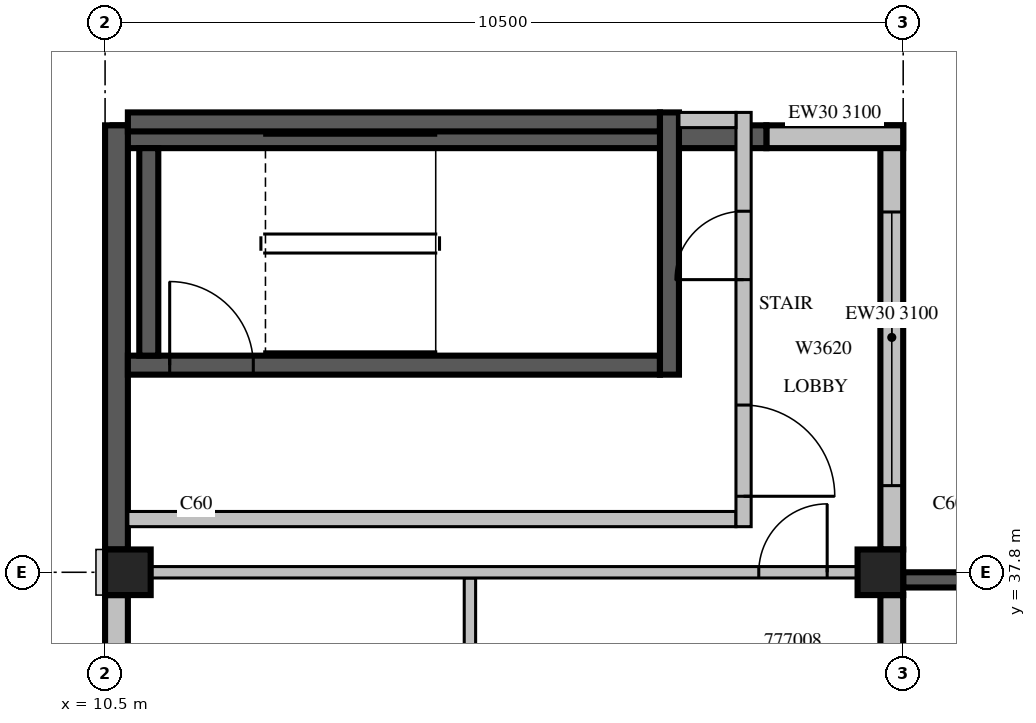
"""IFC4 building model, lengths in metres.
Left out: names, types, materials, properties, quantities, classifications, styles, units other than length and angle.
Written with IfcOpenShell. Run it as: python <this file> out.ifc"""

import sys

from ifc_helpers import new_model, si_unit, direction, frame, frame_2d, origin, origin_2d, place, context, subcontext, project, spatial, rectangle, extrude, source, transform, mapped, element, fill, save


model = new_model("IFC4")
c1 = context("Model", 3, precision=1e-05, world=origin(), true_north=direction((0.0, 1.0)))
c2 = subcontext(c1, "Body", "Model", "MODEL_VIEW")
j1 = project(units=[si_unit("LENGTHUNIT", "METRE"), si_unit("PLANEANGLEUNIT", "RADIAN")], contexts=[c1])
p1 = place(None, origin())
s1 = spatial("IfcSite", under=j1, at=p1, CompositionType="ELEMENT")
p2 = place(p1, origin())
s2 = spatial("IfcBuilding", under=s1, at=p2, CompositionType="ELEMENT")
p3 = place(p2, frame((0.0, 0.0, 330.0)))
s3 = spatial("IfcBuildingStorey", under=s2, at=p3, CompositionType="ELEMENT", Elevation=330.0)
m1 = source(origin(), c2, "Body", "SweptSolid", [
    extrude(rectangle(XDim=0.6, YDim=0.6, at=origin_2d()), origin(), (0.0, 0.0, 1.0), 3.5),
])
for number, where, z_axis, x_axis in (
    (1, (10.8, 37.8, 0.0), (0.0, 0.0, 1.0), (1.0, 0.0, 0.0)),
    (2, (20.7, 37.8, 0.0), (0.0, 0.0, 1.0), (1.0, 0.0, 0.0)),
):
    element("IfcColumn", number, at=place(p3, frame(where, z_axis=z_axis, x_axis=x_axis)), inside=s3, PredefinedType="COLUMN", context=c2, shape_type="MappedRepresentation", body=[
        mapped(m1, transform((0.0, 0.0, 0.0), scale=1.0)),
    ])
m2 = source(origin(), c2, "Body", "SweptSolid", [
    extrude(rectangle(XDim=7.8, YDim=0.3, at=frame_2d((3.9, 0.0))), origin(), (0.0, 0.0, 1.0), 3.1),
])
p4 = place(p3, frame((20.85, 29.7, 0.0), z_axis=(0.0, 0.0, 1.0), x_axis=(0.0, 1.0, 0.0)))
e3 = element("IfcWall", 3, at=p4, inside=s3, PredefinedType="STANDARD", context=c2, shape_type="MappedRepresentation", body=[
    mapped(m2, transform((0.0, 0.0, 0.0), scale=1.0)),
])
m3 = source(origin(), c2, "Body", "SweptSolid", [
    extrude(rectangle(XDim=1.0, YDim=2.1, at=frame_2d((0.5, 1.05))), frame((0.0, 0.16, 0.0), z_axis=(0.0, -1.0, 0.0), x_axis=(1.0, 0.0, 0.0)), (0.0, 0.0, 1.0), 0.32),
])
p5 = place(p4, frame((3.4, 0.0, 0.0)))
e4 = element("IfcOpeningElement", 4, at=p5, cuts=e3, PredefinedType="OPENING", context=c2, shape_type="MappedRepresentation", body=[
    mapped(m3, transform((0.0, 0.0, 0.0), scale=1.0)),
])
m4 = source(origin(), c2, "Body", "SweptSolid", [
    extrude(rectangle(XDim=5.58, YDim=0.3, at=frame_2d((2.79, 0.0))), origin(), (0.0, 0.0, 1.0), 3.1),
])
p6 = place(p3, frame((20.85, 38.1, 0.0), z_axis=(0.0, 0.0, 1.0), x_axis=(0.0, 1.0, 0.0)))
e5 = element("IfcWall", 5, at=p6, inside=s3, PredefinedType="STANDARD", context=c2, shape_type="MappedRepresentation", body=[
    mapped(m4, transform((0.0, 0.0, 0.0), scale=1.0)),
])
m5 = source(origin(), c2, "Body", "SweptSolid", [
    extrude(rectangle(XDim=3.6, YDim=2.0, at=frame_2d((1.8, 1.0))), frame((0.0, 0.16, 0.0), z_axis=(0.0, -1.0, 0.0), x_axis=(1.0, 0.0, 0.0)), (0.0, 0.0, 1.0), 0.32),
])
p7 = place(p6, frame((0.84, 0.0, 0.6)))
e6 = element("IfcOpeningElement", 6, at=p7, cuts=e5, PredefinedType="OPENING", context=c2, shape_type="MappedRepresentation", body=[
    mapped(m5, transform((0.0, 0.0, 0.0), scale=1.0)),
])
m6 = source(origin(), c2, "Body", "SweptSolid", [
    extrude(rectangle(XDim=1.8, YDim=0.3, at=frame_2d((0.9, 0.0))), origin(), (0.0, 0.0, 1.0), 3.1),
])
p8 = place(p3, frame((21.0, 43.53, 0.0), z_axis=(0.0, 0.0, 1.0), x_axis=(-1.0, 0.0, 0.0)))
e7 = element("IfcWall", 7, at=p8, inside=s3, PredefinedType="STANDARD", context=c2, shape_type="MappedRepresentation", body=[
    mapped(m6, transform((0.0, 0.0, 0.0), scale=1.0)),
])
m7 = source(origin(), c2, "Body", "SweptSolid", [
    extrude(rectangle(XDim=8.6, YDim=0.3, at=frame_2d((4.3, 0.0))), origin(), (0.0, 0.0, 1.0), 3.1),
])
p9 = place(p3, frame((19.2, 43.53, 0.0), z_axis=(0.0, 0.0, 1.0), x_axis=(-1.0, 0.0, 0.0)))
e8 = element("IfcWall", 8, at=p9, inside=s3, PredefinedType="SOLIDWALL", context=c2, shape_type="MappedRepresentation", body=[
    mapped(m7, transform((0.0, 0.0, 0.0), scale=1.0)),
])
m8 = source(origin(), c2, "Body", "SweptSolid", [
    extrude(rectangle(XDim=5.58, YDim=0.3, at=frame_2d((2.79, 0.0))), origin(), (0.0, 0.0, 1.0), 3.1),
])
p10 = place(p3, frame((10.65, 43.68, 0.0), z_axis=(0.0, 0.0, 1.0), x_axis=(0.0, -1.0, 0.0)))
e9 = element("IfcWall", 9, at=p10, inside=s3, PredefinedType="SOLIDWALL", context=c2, shape_type="MappedRepresentation", body=[
    mapped(m8, transform((0.0, 0.0, 0.0), scale=1.0)),
])
p11 = place(p3, frame((10.65, 37.5, 0.0), z_axis=(0.0, 0.0, 1.0), x_axis=(0.0, -1.0, 0.0)))
e10 = element("IfcWall", 10, at=p11, inside=s3, PredefinedType="STANDARD", context=c2, shape_type="MappedRepresentation", body=[
    mapped(m2, transform((0.0, 0.0, 0.0), scale=1.0)),
])
p12 = place(p11, frame((3.82, 0.0, 0.0)))
e11 = element("IfcOpeningElement", 11, at=p12, cuts=e10, PredefinedType="OPENING", context=c2, shape_type="MappedRepresentation", body=[
    mapped(m3, transform((0.0, 0.0, 0.0), scale=1.0)),
])
m9 = source(origin(), c2, "Body", "SweptSolid", [
    extrude(rectangle(XDim=3.9, YDim=0.2, at=frame_2d((1.95, 0.0))), origin(), (0.0, 0.0, 1.0), 3.09),
])
p13 = place(p3, frame((21.0, 37.7, 0.0), z_axis=(0.0, 0.0, 1.0), x_axis=(1.0, 0.0, 0.0)))
e12 = element("IfcWall", 12, at=p13, inside=s3, PredefinedType="SOLIDWALL", context=c2, shape_type="MappedRepresentation", body=[
    mapped(m9, transform((0.0, 0.0, 0.0), scale=1.0)),
])
m10 = source(origin(), c2, "Body", "SweptSolid", [
    extrude(rectangle(XDim=2.4, YDim=2.0, at=frame_2d((1.2, 1.0))), frame((0.0, 0.11, 0.0), z_axis=(0.0, -1.0, 0.0), x_axis=(1.0, 0.0, 0.0)), (0.0, 0.0, 1.0), 0.22),
])
p14 = place(p13, frame((0.75, 0.0, 0.6)))
e13 = element("IfcOpeningElement", 13, at=p14, cuts=e12, PredefinedType="OPENING", context=c2, shape_type="MappedRepresentation", body=[
    mapped(m10, transform((0.0, 0.0, 0.0), scale=1.0)),
])
m11 = source(origin(), c2, "Body", "SweptSolid", [
    extrude(rectangle(XDim=7.0, YDim=0.25, at=frame_2d((3.5, 0.0))), origin(), (0.0, 0.0, 1.0), 3.1),
])
p15 = place(p3, frame((10.8, 40.525, 0.0), z_axis=(0.0, 0.0, 1.0), x_axis=(1.0, 0.0, 0.0)))
e14 = element("IfcWall", 14, at=p15, inside=s3, PredefinedType="SOLIDWALL", context=c2, shape_type="MappedRepresentation", body=[
    mapped(m11, transform((0.0, 0.0, 0.0), scale=1.0)),
])
m12 = source(origin(), c2, "Body", "SweptSolid", [
    extrude(rectangle(XDim=1.1, YDim=2.1, at=frame_2d((0.55, 1.05))), frame((0.0, 0.135, 0.0), z_axis=(0.0, -1.0, 0.0), x_axis=(1.0, 0.0, 0.0)), (0.0, 0.0, 1.0), 0.27),
])
p16 = place(p15, frame((0.55, 0.0, 0.0)))
e15 = element("IfcOpeningElement", 15, at=p16, cuts=e14, PredefinedType="OPENING", context=c2, shape_type="MappedRepresentation", body=[
    mapped(m12, transform((0.0, 0.0, 0.0), scale=1.0)),
])
p17 = place(p3, frame((10.8, 43.725, 0.0), z_axis=(0.0, 0.0, 1.0), x_axis=(1.0, 0.0, 0.0)))
e16 = element("IfcWall", 16, at=p17, inside=s3, PredefinedType="SOLIDWALL", context=c2, shape_type="MappedRepresentation", body=[
    mapped(m11, transform((0.0, 0.0, 0.0), scale=1.0)),
])
m13 = source(origin(), c2, "Body", "SweptSolid", [
    extrude(rectangle(XDim=3.45, YDim=0.25, at=frame_2d((1.725, 0.0))), origin(), (0.0, 0.0, 1.0), 3.1),
])
p18 = place(p3, frame((17.925, 40.4, 0.0), z_axis=(0.0, 0.0, 1.0), x_axis=(0.0, 1.0, 0.0)))
e17 = element("IfcWall", 17, at=p18, inside=s3, PredefinedType="SOLIDWALL", context=c2, shape_type="MappedRepresentation", body=[
    mapped(m13, transform((0.0, 0.0, 0.0), scale=1.0)),
])
m14 = source(origin(), c2, "Body", "SweptSolid", [
    extrude(rectangle(XDim=2.73, YDim=0.25, at=frame_2d((1.365, 0.0))), origin(), (0.0, 0.0, 1.0), 3.1),
])
p19 = place(p3, frame((11.075, 40.65, 0.0), z_axis=(0.0, 0.0, 1.0), x_axis=(0.0, 1.0, 0.0)))
e18 = element("IfcWall", 18, at=p19, inside=s3, PredefinedType="SOLIDWALL", context=c2, shape_type="MappedRepresentation", body=[
    mapped(m14, transform((0.0, 0.0, 0.0), scale=1.0)),
])
m15 = source(origin(), c2, "Body", "SweptSolid", [
    extrude(rectangle(XDim=8.0, YDim=0.2, at=frame_2d((4.0, 0.0))), origin(), (0.0, 0.0, 1.0), 3.1),
])
p20 = place(p3, frame((10.8, 38.5, 0.0), z_axis=(0.0, 0.0, 1.0), x_axis=(1.0, 0.0, 0.0)))
e19 = element("IfcWall", 19, at=p20, inside=s3, PredefinedType="PARTITIONING", context=c2, shape_type="MappedRepresentation", body=[
    mapped(m15, transform((0.0, 0.0, 0.0), scale=1.0)),
])
m16 = source(origin(), c2, "Body", "SweptSolid", [
    extrude(rectangle(XDim=5.45, YDim=0.2, at=frame_2d((2.725, 0.0))), origin(), (0.0, 0.0, 1.0), 3.1),
])
p21 = place(p3, frame((18.9, 38.4, 0.0), z_axis=(0.0, 0.0, 1.0), x_axis=(0.0, 1.0, 0.0)))
e20 = element("IfcWall", 20, at=p21, inside=s3, PredefinedType="PARTITIONING", context=c2, shape_type="MappedRepresentation", body=[
    mapped(m16, transform((0.0, 0.0, 0.0), scale=1.0)),
])
m17 = source(origin(), c2, "Body", "SweptSolid", [
    extrude(rectangle(XDim=1.2, YDim=2.1, at=frame_2d((0.6, 1.05))), frame((0.0, 0.11, 0.0), z_axis=(0.0, -1.0, 0.0), x_axis=(1.0, 0.0, 0.0)), (0.0, 0.0, 1.0), 0.22),
])
p22 = place(p21, frame((0.4, 0.0, 0.0)))
e21 = element("IfcOpeningElement", 21, at=p22, cuts=e20, PredefinedType="OPENING", context=c2, shape_type="MappedRepresentation", body=[
    mapped(m17, transform((0.0, 0.0, 0.0), scale=1.0)),
])
m18 = source(origin(), c2, "Body", "SweptSolid", [
    extrude(rectangle(XDim=0.9, YDim=2.1, at=frame_2d((0.45, 1.05))), frame((0.0, 0.11, 0.0), z_axis=(0.0, -1.0, 0.0), x_axis=(1.0, 0.0, 0.0)), (0.0, 0.0, 1.0), 0.22),
])
p23 = place(p21, frame((3.25, 0.0, 0.0)))
e22 = element("IfcOpeningElement", 22, at=p23, cuts=e20, PredefinedType="OPENING", context=c2, shape_type="MappedRepresentation", body=[
    mapped(m18, transform((0.0, 0.0, 0.0), scale=1.0)),
])
m19 = source(origin(), c2, "Body", "SweptSolid", [
    extrude(rectangle(XDim=0.75, YDim=0.2, at=frame_2d((0.375, 0.0))), origin(), (0.0, 0.0, 1.0), 3.1),
])
p24 = place(p3, frame((18.05, 43.75, 0.0), z_axis=(0.0, 0.0, 1.0), x_axis=(1.0, 0.0, 0.0)))
e23 = element("IfcWall", 23, at=p24, inside=s3, PredefinedType="PARTITIONING", context=c2, shape_type="MappedRepresentation", body=[
    mapped(m19, transform((0.0, 0.0, 0.0), scale=1.0)),
])
p25 = place(p3, frame((15.3, 37.725, 0.0), z_axis=(0.0, 0.0, 1.0), x_axis=(0.0, -1.0, 0.0)))
e24 = element("IfcWall", 24, at=p25, inside=s3, PredefinedType="PARTITIONING", context=c2, shape_type="SweptSolid", body=[
    extrude(rectangle(XDim=8.325, YDim=0.15, at=frame_2d((4.162, 0.0))), origin(), (0.0, 0.0, 1.0), 3.1),
])
m20 = source(origin(), c2, "Body", "SweptSolid", [
    extrude(rectangle(XDim=1.0, YDim=2.1, at=frame_2d((0.5, 1.05))), frame((0.0, 0.085, 0.0), z_axis=(0.0, -1.0, 0.0), x_axis=(1.0, 0.0, 0.0)), (0.0, 0.0, 1.0), 0.17),
])
p26 = place(p25, frame((3.625, 0.0, 0.0)))
e25 = element("IfcOpeningElement", 25, at=p26, cuts=e24, PredefinedType="OPENING", context=c2, shape_type="MappedRepresentation", body=[
    mapped(m20, transform((0.0, 0.0, 0.0), scale=1.0)),
])
m21 = source(origin(), c2, "Body", "SweptSolid", [
    extrude(rectangle(XDim=9.302, YDim=0.15, at=frame_2d((4.651, 0.0))), origin(), (0.0, 0.0, 1.0), 3.1),
])
p27 = place(p3, frame((20.401, 37.8, 0.0), z_axis=(0.0, 0.0, 1.0), x_axis=(-1.0, 0.0, 0.0)))
e26 = element("IfcWall", 26, at=p27, inside=s3, PredefinedType="PARTITIONING", context=c2, shape_type="MappedRepresentation", body=[
    mapped(m21, transform((0.0, 0.0, 0.0), scale=1.0)),
])
m22 = source(origin(), c2, "Body", "SweptSolid", [
    extrude(rectangle(XDim=0.9, YDim=2.1, at=frame_2d((0.45, 1.05))), frame((0.0, 0.085, 0.0), z_axis=(0.0, -1.0, 0.0), x_axis=(1.0, 0.0, 0.0)), (0.0, 0.0, 1.0), 0.17),
])
p28 = place(p27, frame((0.401, 0.0, 0.0)))
e27 = element("IfcOpeningElement", 27, at=p28, cuts=e26, PredefinedType="OPENING", context=c2, shape_type="MappedRepresentation", body=[
    mapped(m22, transform((0.0, 0.0, 0.0), scale=1.0)),
])
m23 = source(origin(), c2, "Body", "SweptSolid", [
    extrude(rectangle(XDim=3.6, YDim=2.0, at=frame_2d((1.8, 1.0))), frame((0.0, 0.03, 0.0), z_axis=(0.0, -1.0, 0.0), x_axis=(1.0, 0.0, 0.0)), (0.0, 0.0, 1.0), 0.06),
])
p29 = place(p7, origin())
e28 = element("IfcWindow", 28, at=p29, inside=s3, PartitioningType="SINGLE_PANEL", PredefinedType="WINDOW", context=c2, shape_type="MappedRepresentation", body=[
    mapped(m23, transform((0.0, 0.0, 0.0), scale=1.0)),
])
fill(e6, e28)
m24 = source(origin(), c2, "Body", "SweptSolid", [
    extrude(rectangle(XDim=1.1, YDim=2.1, at=frame_2d((0.55, 1.05))), frame((0.0, 0.025, 0.0), z_axis=(0.0, -1.0, 0.0), x_axis=(1.0, 0.0, 0.0)), (0.0, 0.0, 1.0), 0.05),
])
p30 = place(p16, origin())
e29 = element("IfcDoor", 29, at=p30, inside=s3, OperationType="SINGLE_SWING_LEFT", PredefinedType="DOOR", context=c2, shape_type="MappedRepresentation", body=[
    mapped(m24, transform((0.0, 0.0, 0.0), scale=1.0)),
])
fill(e15, e29)
m25 = source(origin(), c2, "Body", "SweptSolid", [
    extrude(rectangle(XDim=1.2, YDim=2.1, at=frame_2d((0.6, 1.05))), frame((0.0, 0.025, 0.0), z_axis=(0.0, -1.0, 0.0), x_axis=(1.0, 0.0, 0.0)), (0.0, 0.0, 1.0), 0.05),
])
p31 = place(p22, origin())
e30 = element("IfcDoor", 30, at=p31, inside=s3, OperationType="SINGLE_SWING_RIGHT", PredefinedType="DOOR", context=c2, shape_type="MappedRepresentation", body=[
    mapped(m25, transform((0.0, 0.0, 0.0), scale=1.0)),
])
fill(e21, e30)
m26 = source(origin(), c2, "Body", "SweptSolid", [
    extrude(rectangle(XDim=0.9, YDim=2.1, at=frame_2d((0.45, 1.05))), frame((0.0, 0.025, 0.0), z_axis=(0.0, -1.0, 0.0), x_axis=(1.0, 0.0, 0.0)), (0.0, 0.0, 1.0), 0.05),
])
p32 = place(p23, origin())
e31 = element("IfcDoor", 31, at=p32, inside=s3, OperationType="SINGLE_SWING_LEFT", PredefinedType="DOOR", context=c2, shape_type="MappedRepresentation", body=[
    mapped(m26, transform((0.0, 0.0, 0.0), scale=1.0)),
])
fill(e22, e31)
p33 = place(p28, origin())
e32 = element("IfcDoor", 32, at=p33, inside=s3, OperationType="SINGLE_SWING_RIGHT", PredefinedType="DOOR", context=c2, shape_type="MappedRepresentation", body=[
    mapped(m26, transform((0.0, 0.0, 0.0), scale=1.0)),
])
fill(e27, e32)
save(model, sys.argv[1])
